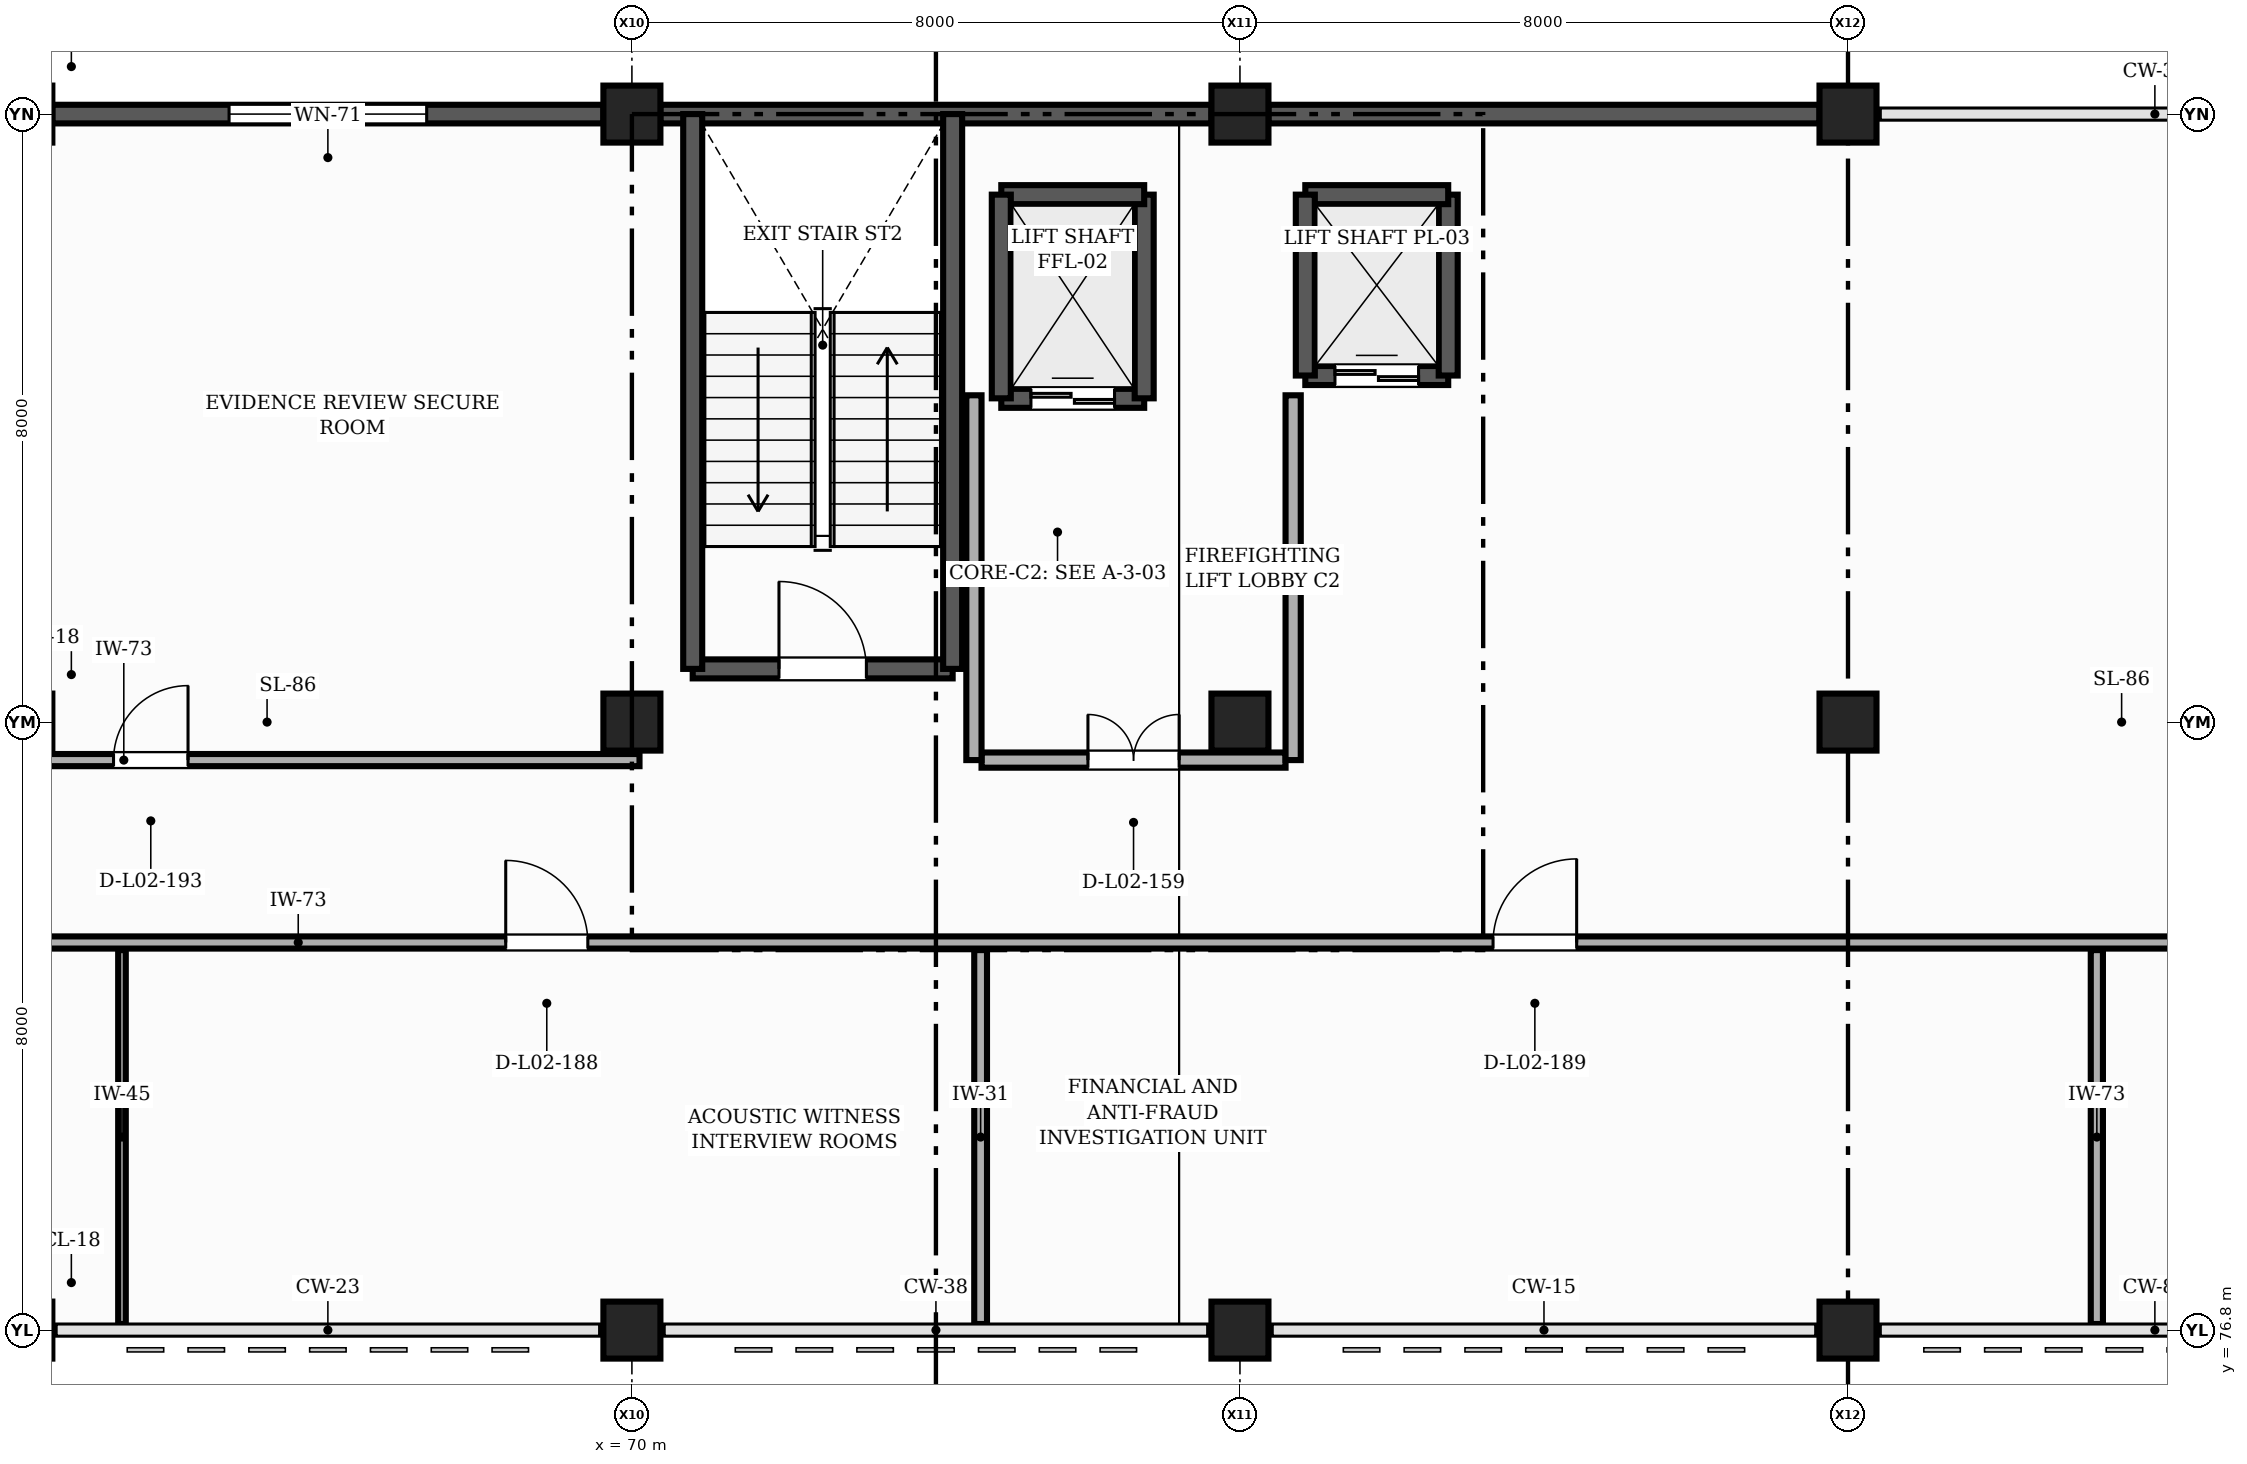
"""IFC4 building model, lengths in metres.
Left out: names, types, materials, properties, quantities, classifications, styles, units other than length and angle.
Written with IfcOpenShell. Run it as: python <this file> out.ifc"""

import sys

from ifc_helpers import new_model, si_unit, direction, frame, frame_2d, origin, origin_2d, place, context, subcontext, project, spatial, rectangle, extrude, element, fill, save


model = new_model("IFC4")
c1 = context("Model", 3, precision=1e-05, world=origin(), true_north=direction((0.0, 1.0)))
c2 = subcontext(c1, "Body", "Model", "MODEL_VIEW")
j1 = project(units=[si_unit("LENGTHUNIT", "METRE"), si_unit("PLANEANGLEUNIT", "RADIAN")], contexts=[c1])
p1 = place(None, origin())
s1 = spatial("IfcSite", under=j1, at=p1, CompositionType="ELEMENT")
p2 = place(p1, origin())
s2 = spatial("IfcBuilding", under=s1, at=p2, CompositionType="ELEMENT")
p3 = place(p2, frame((0.0, 0.0, 9.0)))
s3 = spatial("IfcBuildingStorey", under=s2, at=p3, CompositionType="ELEMENT", Elevation=9.0)
for number, where, z_axis, x_axis in (
    (1, (62.0, 76.8, 0.0), (0.0, 0.0, 1.0), (1.0, 0.0, 0.0)),
    (2, (62.0, 84.8, 0.0), (0.0, 0.0, 1.0), (1.0, 0.0, 0.0)),
    (3, (62.0, 92.8, 0.0), (0.0, 0.0, 1.0), (1.0, 0.0, 0.0)),
    (4, (70.0, 76.8, 0.0), (0.0, 0.0, 1.0), (1.0, 0.0, 0.0)),
    (5, (70.0, 84.8, 0.0), (0.0, 0.0, 1.0), (1.0, 0.0, 0.0)),
    (6, (70.0, 92.8, 0.0), (0.0, 0.0, 1.0), (1.0, 0.0, 0.0)),
    (7, (78.0, 76.8, 0.0), (0.0, 0.0, 1.0), (1.0, 0.0, 0.0)),
    (8, (78.0, 84.8, 0.0), (0.0, 0.0, 1.0), (1.0, 0.0, 0.0)),
    (9, (78.0, 92.8, 0.0), (0.0, 0.0, 1.0), (1.0, 0.0, 0.0)),
    (10, (86.0, 76.8, 0.0), (0.0, 0.0, 1.0), (1.0, 0.0, 0.0)),
    (11, (86.0, 84.8, 0.0), (0.0, 0.0, 1.0), (1.0, 0.0, 0.0)),
    (12, (86.0, 92.8, 0.0), (0.0, 0.0, 1.0), (1.0, 0.0, 0.0)),
):
    element("IfcColumn", number, at=place(p3, frame(where, z_axis=z_axis, x_axis=x_axis)), inside=s3, PredefinedType="COLUMN", context=c2, shape_type="SweptSolid", body=[
        extrude(rectangle(XDim=0.75, YDim=0.75, at=origin_2d()), origin(), (0.0, 0.0, 1.0), 4.5),
    ])
p4 = place(p3, frame((85.625, 92.8, 0.0), z_axis=(0.0, 0.0, 1.0), x_axis=(-1.0, 0.0, 0.0)))
e13 = element("IfcWall", 13, at=p4, inside=s3, PredefinedType="SOLIDWALL", context=c2, shape_type="SweptSolid", body=[
    extrude(rectangle(XDim=7.25, YDim=0.245, at=frame_2d((3.625, 0.0))), origin(), (0.0, 0.0, 1.0), 3.57),
])
p5 = place(p3, frame((77.625, 92.8, 0.0), z_axis=(0.0, 0.0, 1.0), x_axis=(-1.0, 0.0, 0.0)))
e14 = element("IfcWall", 14, at=p5, inside=s3, PredefinedType="SOLIDWALL", context=c2, shape_type="SweptSolid", body=[
    extrude(rectangle(XDim=7.25, YDim=0.245, at=frame_2d((3.625, 0.0))), origin(), (0.0, 0.0, 1.0), 4.22),
])
p6 = place(p3, frame((69.625, 92.8, 0.0), z_axis=(0.0, 0.0, 1.0), x_axis=(-1.0, 0.0, 0.0)))
e15 = element("IfcWall", 15, at=p6, inside=s3, PredefinedType="SOLIDWALL", context=c2, shape_type="SweptSolid", body=[
    extrude(rectangle(XDim=7.25, YDim=0.245, at=frame_2d((3.625, 0.0))), origin(), (0.0, 0.0, 1.0), 3.57),
])
p7 = place(p6, frame((2.325, 0.0, 0.9)))
e16 = element("IfcOpeningElement", 16, at=p7, cuts=e15, PredefinedType="OPENING", context=c2, shape_type="SweptSolid", body=[
    extrude(rectangle(XDim=2.6, YDim=1.8, at=frame_2d((1.3, 0.9))), frame((0.0, 0.133, 0.0), z_axis=(0.0, -1.0, 0.0), x_axis=(1.0, 0.0, 0.0)), (0.0, 0.0, 1.0), 0.265),
])
p8 = place(p3, frame((70.8, 85.5, 0.0), z_axis=(0.0, 0.0, 1.0), x_axis=(1.0, 0.0, 0.0)))
e17 = element("IfcWall", 17, at=p8, inside=s3, PredefinedType="SHEAR", context=c2, shape_type="SweptSolid", body=[
    extrude(rectangle(XDim=3.42, YDim=0.25, at=frame_2d((1.71, 0.0))), origin(), (0.0, 0.0, 1.0), 4.5),
])
p9 = place(p8, frame((1.135, 0.0, 0.0)))
e18 = element("IfcOpeningElement", 18, at=p9, cuts=e17, PredefinedType="OPENING", context=c2, shape_type="SweptSolid", body=[
    extrude(rectangle(XDim=1.15, YDim=2.15, at=frame_2d((0.575, 1.075))), frame((0.0, 0.135, 0.0), z_axis=(0.0, -1.0, 0.0), x_axis=(1.0, 0.0, 0.0)), (0.0, 0.0, 1.0), 0.27),
])
for number, where, z_axis, x_axis in (
    (19, (74.22, 85.5, 0.0), (0.0, 0.0, 1.0), (0.0, 1.0, 0.0)),
    (20, (70.8, 92.8, 0.0), (0.0, 0.0, 1.0), (0.0, -1.0, 0.0)),
):
    element("IfcWall", number, at=place(p3, frame(where, z_axis=z_axis, x_axis=x_axis)), inside=s3, PredefinedType="SHEAR", context=c2, shape_type="SweptSolid", body=[
        extrude(rectangle(XDim=7.3, YDim=0.25, at=frame_2d((3.65, 0.0))), origin(), (0.0, 0.0, 1.0), 4.5),
    ])
p10 = place(p3, frame((74.86, 89.06, 0.0), z_axis=(0.0, 0.0, 1.0), x_axis=(1.0, 0.0, 0.0)))
e21 = element("IfcWall", 21, at=p10, inside=s3, PredefinedType="SHEAR", context=c2, shape_type="SweptSolid", body=[
    extrude(rectangle(XDim=1.88, YDim=0.25, at=frame_2d((0.94, 0.0))), origin(), (0.0, 0.0, 1.0), 4.5),
])
p11 = place(p10, frame((0.39, 0.0, 0.0)))
e22 = element("IfcOpeningElement", 22, at=p11, cuts=e21, PredefinedType="OPENING", context=c2, shape_type="SweptSolid", body=[
    extrude(rectangle(XDim=1.1, YDim=2.2, at=frame_2d((0.55, 1.1))), frame((0.0, 0.135, 0.0), z_axis=(0.0, -1.0, 0.0), x_axis=(1.0, 0.0, 0.0)), (0.0, 0.0, 1.0), 0.27),
])
p12 = place(p3, frame((76.74, 89.06, 0.0), z_axis=(0.0, 0.0, 1.0), x_axis=(0.0, 1.0, 0.0)))
e23 = element("IfcWall", 23, at=p12, inside=s3, PredefinedType="SHEAR", context=c2, shape_type="SweptSolid", body=[
    extrude(rectangle(XDim=2.68, YDim=0.25, at=frame_2d((1.34, 0.0))), origin(), (0.0, 0.0, 1.0), 4.5),
])
p13 = place(p3, frame((76.74, 91.74, 0.0), z_axis=(0.0, 0.0, 1.0), x_axis=(-1.0, 0.0, 0.0)))
e24 = element("IfcWall", 24, at=p13, inside=s3, PredefinedType="SHEAR", context=c2, shape_type="SweptSolid", body=[
    extrude(rectangle(XDim=1.88, YDim=0.25, at=frame_2d((0.94, 0.0))), origin(), (0.0, 0.0, 1.0), 4.5),
])
p14 = place(p3, frame((74.86, 91.74, 0.0), z_axis=(0.0, 0.0, 1.0), x_axis=(0.0, -1.0, 0.0)))
e25 = element("IfcWall", 25, at=p14, inside=s3, PredefinedType="SHEAR", context=c2, shape_type="SweptSolid", body=[
    extrude(rectangle(XDim=2.68, YDim=0.25, at=frame_2d((1.34, 0.0))), origin(), (0.0, 0.0, 1.0), 4.5),
])
p15 = place(p3, frame((78.86, 89.36, 0.0), z_axis=(0.0, 0.0, 1.0), x_axis=(1.0, 0.0, 0.0)))
e26 = element("IfcWall", 26, at=p15, inside=s3, PredefinedType="SHEAR", context=c2, shape_type="SweptSolid", body=[
    extrude(rectangle(XDim=1.88, YDim=0.25, at=frame_2d((0.94, 0.0))), origin(), (0.0, 0.0, 1.0), 4.5),
])
p16 = place(p15, frame((0.39, 0.0, 0.0)))
e27 = element("IfcOpeningElement", 27, at=p16, cuts=e26, PredefinedType="OPENING", context=c2, shape_type="SweptSolid", body=[
    extrude(rectangle(XDim=1.1, YDim=2.2, at=frame_2d((0.55, 1.1))), frame((0.0, 0.135, 0.0), z_axis=(0.0, -1.0, 0.0), x_axis=(1.0, 0.0, 0.0)), (0.0, 0.0, 1.0), 0.27),
])
p17 = place(p3, frame((80.74, 89.36, 0.0), z_axis=(0.0, 0.0, 1.0), x_axis=(0.0, 1.0, 0.0)))
e28 = element("IfcWall", 28, at=p17, inside=s3, PredefinedType="SHEAR", context=c2, shape_type="SweptSolid", body=[
    extrude(rectangle(XDim=2.38, YDim=0.25, at=frame_2d((1.19, 0.0))), origin(), (0.0, 0.0, 1.0), 4.5),
])
p18 = place(p3, frame((80.74, 91.74, 0.0), z_axis=(0.0, 0.0, 1.0), x_axis=(-1.0, 0.0, 0.0)))
e29 = element("IfcWall", 29, at=p18, inside=s3, PredefinedType="SHEAR", context=c2, shape_type="SweptSolid", body=[
    extrude(rectangle(XDim=1.88, YDim=0.25, at=frame_2d((0.94, 0.0))), origin(), (0.0, 0.0, 1.0), 4.5),
])
p19 = place(p3, frame((78.86, 91.74, 0.0), z_axis=(0.0, 0.0, 1.0), x_axis=(0.0, -1.0, 0.0)))
e30 = element("IfcWall", 30, at=p19, inside=s3, PredefinedType="SHEAR", context=c2, shape_type="SweptSolid", body=[
    extrude(rectangle(XDim=2.38, YDim=0.25, at=frame_2d((1.19, 0.0))), origin(), (0.0, 0.0, 1.0), 4.5),
])
p20 = place(p3, frame((74.6, 84.3, 0.0), z_axis=(0.0, 0.0, 1.0), x_axis=(1.0, 0.0, 0.0)))
e31 = element("IfcWall", 31, at=p20, inside=s3, PredefinedType="PARTITIONING", context=c2, shape_type="SweptSolid", body=[
    extrude(rectangle(XDim=4.0, YDim=0.2, at=frame_2d((2.0, 0.0))), origin(), (0.0, 0.0, 1.0), 3.555),
])
p21 = place(p20, frame((1.4, 0.0, 0.0)))
e32 = element("IfcOpeningElement", 32, at=p21, cuts=e31, PredefinedType="OPENING", context=c2, shape_type="SweptSolid", body=[
    extrude(rectangle(XDim=1.2, YDim=2.15, at=frame_2d((0.6, 1.075))), frame((0.0, 0.11, 0.0), z_axis=(0.0, -1.0, 0.0), x_axis=(1.0, 0.0, 0.0)), (0.0, 0.0, 1.0), 0.22),
])
p22 = place(p3, frame((74.5, 84.3, 0.0), z_axis=(0.0, 0.0, 1.0), x_axis=(0.0, 1.0, 0.0)))
e33 = element("IfcWall", 33, at=p22, inside=s3, PredefinedType="PARTITIONING", context=c2, shape_type="SweptSolid", body=[
    extrude(rectangle(XDim=4.8, YDim=0.2, at=frame_2d((2.4, 0.0))), origin(), (0.0, 0.0, 1.0), 3.355),
])
p23 = place(p3, frame((78.7, 84.3, 0.0), z_axis=(0.0, 0.0, 1.0), x_axis=(0.0, 1.0, 0.0)))
e34 = element("IfcWall", 34, at=p23, inside=s3, PredefinedType="PARTITIONING", context=c2, shape_type="SweptSolid", body=[
    extrude(rectangle(XDim=4.8, YDim=0.2, at=frame_2d((2.4, 0.0))), origin(), (0.0, 0.0, 1.0), 3.455),
])
p24 = place(p3, frame((63.291, 76.88, 0.0), z_axis=(0.0, 0.0, 1.0), x_axis=(0.0, 1.0, 0.0)))
e35 = element("IfcWall", 35, at=p24, inside=s3, PredefinedType="PARTITIONING", context=c2, shape_type="SweptSolid", body=[
    extrude(rectangle(XDim=4.92, YDim=0.1, at=frame_2d((2.46, 0.0))), origin(), (0.0, 0.0, 1.0), 4.22),
])
p25 = place(p3, frame((74.588, 76.88, 0.0), z_axis=(0.0, 0.0, 1.0), x_axis=(0.0, 1.0, 0.0)))
e36 = element("IfcWall", 36, at=p25, inside=s3, PredefinedType="PARTITIONING", context=c2, shape_type="SweptSolid", body=[
    extrude(rectangle(XDim=4.92, YDim=0.168, at=frame_2d((2.46, 0.0))), origin(), (0.0, 0.0, 1.0), 3.555),
])
p26 = place(p3, frame((89.274, 76.88, 0.0), z_axis=(0.0, 0.0, 1.0), x_axis=(0.0, 1.0, 0.0)))
e37 = element("IfcWall", 37, at=p26, inside=s3, PredefinedType="PARTITIONING", context=c2, shape_type="SweptSolid", body=[
    extrude(rectangle(XDim=4.92, YDim=0.16, at=frame_2d((2.46, 0.0))), origin(), (0.0, 0.0, 1.0), 3.555),
])
p27 = place(p3, frame((29.3, 81.9, 0.0), z_axis=(0.0, 0.0, 1.0), x_axis=(1.0, 0.0, 0.0)))
e38 = element("IfcWall", 38, at=p27, inside=s3, PredefinedType="PARTITIONING", context=c2, shape_type="SweptSolid", body=[
    extrude(rectangle(XDim=72.62, YDim=0.16, at=frame_2d((36.31, 0.0))), origin(), (0.0, 0.0, 1.0), 3.555),
])
p28 = place(p27, frame((9.06, 0.0, 0.0)))
e39 = element("IfcOpeningElement", 39, at=p28, cuts=e38, PredefinedType="OPENING", context=c2, shape_type="SweptSolid", body=[
    extrude(rectangle(XDim=1.02, YDim=2.12, at=frame_2d((0.51, 1.06))), frame((0.0, 0.09, 0.0), z_axis=(0.0, -1.0, 0.0), x_axis=(1.0, 0.0, 0.0)), (0.0, 0.0, 1.0), 0.18),
])
p29 = place(p27, frame((26.55, 0.0, 0.0)))
e40 = element("IfcOpeningElement", 40, at=p29, cuts=e38, PredefinedType="OPENING", context=c2, shape_type="SweptSolid", body=[
    extrude(rectangle(XDim=1.05, YDim=2.1, at=frame_2d((0.525, 1.05))), frame((0.0, 0.09, 0.0), z_axis=(0.0, -1.0, 0.0), x_axis=(1.0, 0.0, 0.0)), (0.0, 0.0, 1.0), 0.18),
])
p30 = place(p27, frame((39.04, 0.0, 0.0)))
e41 = element("IfcOpeningElement", 41, at=p30, cuts=e38, PredefinedType="OPENING", context=c2, shape_type="SweptSolid", body=[
    extrude(rectangle(XDim=1.08, YDim=2.14, at=frame_2d((0.54, 1.07))), frame((0.0, 0.09, 0.0), z_axis=(0.0, -1.0, 0.0), x_axis=(1.0, 0.0, 0.0)), (0.0, 0.0, 1.0), 0.18),
])
p31 = place(p27, frame((52.03, 0.0, 0.0)))
e42 = element("IfcOpeningElement", 42, at=p31, cuts=e38, PredefinedType="OPENING", context=c2, shape_type="SweptSolid", body=[
    extrude(rectangle(XDim=1.1, YDim=2.1, at=frame_2d((0.55, 1.05))), frame((0.0, 0.09, 0.0), z_axis=(0.0, -1.0, 0.0), x_axis=(1.0, 0.0, 0.0)), (0.0, 0.0, 1.0), 0.18),
])
p32 = place(p27, frame((65.63, 0.0, 0.0)))
e43 = element("IfcOpeningElement", 43, at=p32, cuts=e38, PredefinedType="OPENING", context=c2, shape_type="SweptSolid", body=[
    extrude(rectangle(XDim=0.9, YDim=2.1, at=frame_2d((0.45, 1.05))), frame((0.0, 0.09, 0.0), z_axis=(0.0, -1.0, 0.0), x_axis=(1.0, 0.0, 0.0)), (0.0, 0.0, 1.0), 0.18),
])
p33 = place(p3, frame((34.7, 84.3, 0.0), z_axis=(0.0, 0.0, 1.0), x_axis=(1.0, 0.0, 0.0)))
e44 = element("IfcWall", 44, at=p33, inside=s3, PredefinedType="PARTITIONING", context=c2, shape_type="SweptSolid", body=[
    extrude(rectangle(XDim=35.4, YDim=0.16, at=frame_2d((17.7, 0.0))), origin(), (0.0, 0.0, 1.0), 3.555),
])
p34 = place(p33, frame((5.92, 0.0, 0.0)))
e45 = element("IfcOpeningElement", 45, at=p34, cuts=e44, PredefinedType="OPENING", context=c2, shape_type="SweptSolid", body=[
    extrude(rectangle(XDim=0.92, YDim=2.1, at=frame_2d((0.46, 1.05))), frame((0.0, 0.09, 0.0), z_axis=(0.0, -1.0, 0.0), x_axis=(1.0, 0.0, 0.0)), (0.0, 0.0, 1.0), 0.18),
])
p35 = place(p33, frame((17.2, 0.0, 0.0)))
e46 = element("IfcOpeningElement", 46, at=p35, cuts=e44, PredefinedType="OPENING", context=c2, shape_type="SweptSolid", body=[
    extrude(rectangle(XDim=0.95, YDim=2.15, at=frame_2d((0.475, 1.075))), frame((0.0, 0.09, 0.0), z_axis=(0.0, -1.0, 0.0), x_axis=(1.0, 0.0, 0.0)), (0.0, 0.0, 1.0), 0.18),
])
p36 = place(p33, frame((28.48, 0.0, 0.0)))
e47 = element("IfcOpeningElement", 47, at=p36, cuts=e44, PredefinedType="OPENING", context=c2, shape_type="SweptSolid", body=[
    extrude(rectangle(XDim=0.98, YDim=2.12, at=frame_2d((0.49, 1.06))), frame((0.0, 0.09, 0.0), z_axis=(0.0, -1.0, 0.0), x_axis=(1.0, 0.0, 0.0)), (0.0, 0.0, 1.0), 0.18),
])
p37 = place(p7, origin())
e48 = element("IfcWindow", 48, at=p37, inside=s3, PartitioningType="SINGLE_PANEL", PredefinedType="WINDOW", context=c2, shape_type="SweptSolid", body=[
    extrude(rectangle(XDim=2.6, YDim=1.8, at=frame_2d((1.3, 0.9))), frame((0.0, 0.03, 0.0), z_axis=(0.0, -1.0, 0.0), x_axis=(1.0, 0.0, 0.0)), (0.0, 0.0, 1.0), 0.06),
])
fill(e16, e48)
p38 = place(p9, origin())
e49 = element("IfcDoor", 49, at=p38, inside=s3, OperationType="SINGLE_SWING_LEFT", PredefinedType="DOOR", context=c2, shape_type="SweptSolid", body=[
    extrude(rectangle(XDim=1.15, YDim=2.15, at=frame_2d((0.575, 1.075))), frame((0.0, 0.025, 0.0), z_axis=(0.0, -1.0, 0.0), x_axis=(1.0, 0.0, 0.0)), (0.0, 0.0, 1.0), 0.05),
])
fill(e18, e49)
p39 = place(p11, origin())
e50 = element("IfcDoor", 50, at=p39, inside=s3, OperationType="DOUBLE_DOOR_SLIDING", PredefinedType="DOOR", context=c2, shape_type="SweptSolid", body=[
    extrude(rectangle(XDim=1.1, YDim=2.2, at=frame_2d((0.55, 1.1))), frame((0.0, 0.025, 0.0), z_axis=(0.0, -1.0, 0.0), x_axis=(1.0, 0.0, 0.0)), (0.0, 0.0, 1.0), 0.05),
])
fill(e22, e50)
p40 = place(p16, origin())
e51 = element("IfcDoor", 51, at=p40, inside=s3, OperationType="DOUBLE_DOOR_SLIDING", PredefinedType="DOOR", context=c2, shape_type="SweptSolid", body=[
    extrude(rectangle(XDim=1.1, YDim=2.2, at=frame_2d((0.55, 1.1))), frame((0.0, 0.025, 0.0), z_axis=(0.0, -1.0, 0.0), x_axis=(1.0, 0.0, 0.0)), (0.0, 0.0, 1.0), 0.05),
])
fill(e27, e51)
p41 = place(p21, origin())
e52 = element("IfcDoor", 52, at=p41, inside=s3, OperationType="DOUBLE_DOOR_SINGLE_SWING", PredefinedType="DOOR", context=c2, shape_type="SweptSolid", body=[
    extrude(rectangle(XDim=1.2, YDim=2.15, at=frame_2d((0.6, 1.075))), frame((0.0, 0.025, 0.0), z_axis=(0.0, -1.0, 0.0), x_axis=(1.0, 0.0, 0.0)), (0.0, 0.0, 1.0), 0.05),
])
fill(e32, e52)
p42 = place(p30, origin())
e53 = element("IfcDoor", 53, at=p42, inside=s3, OperationType="SINGLE_SWING_LEFT", PredefinedType="DOOR", context=c2, shape_type="SweptSolid", body=[
    extrude(rectangle(XDim=1.08, YDim=2.14, at=frame_2d((0.54, 1.07))), frame((0.0, 0.025, 0.0), z_axis=(0.0, -1.0, 0.0), x_axis=(1.0, 0.0, 0.0)), (0.0, 0.0, 1.0), 0.05),
])
fill(e41, e53)
p43 = place(p31, origin())
e54 = element("IfcDoor", 54, at=p43, inside=s3, OperationType="SINGLE_SWING_RIGHT", PredefinedType="DOOR", context=c2, shape_type="SweptSolid", body=[
    extrude(rectangle(XDim=1.1, YDim=2.1, at=frame_2d((0.55, 1.05))), frame((0.0, 0.025, 0.0), z_axis=(0.0, -1.0, 0.0), x_axis=(1.0, 0.0, 0.0)), (0.0, 0.0, 1.0), 0.05),
])
fill(e42, e54)
p44 = place(p36, origin())
e55 = element("IfcDoor", 55, at=p44, inside=s3, OperationType="SINGLE_SWING_RIGHT", PredefinedType="DOOR", context=c2, shape_type="SweptSolid", body=[
    extrude(rectangle(XDim=0.98, YDim=2.12, at=frame_2d((0.49, 1.06))), frame((0.0, 0.025, 0.0), z_axis=(0.0, -1.0, 0.0), x_axis=(1.0, 0.0, 0.0)), (0.0, 0.0, 1.0), 0.05),
])
fill(e47, e55)
save(model, sys.argv[1])
